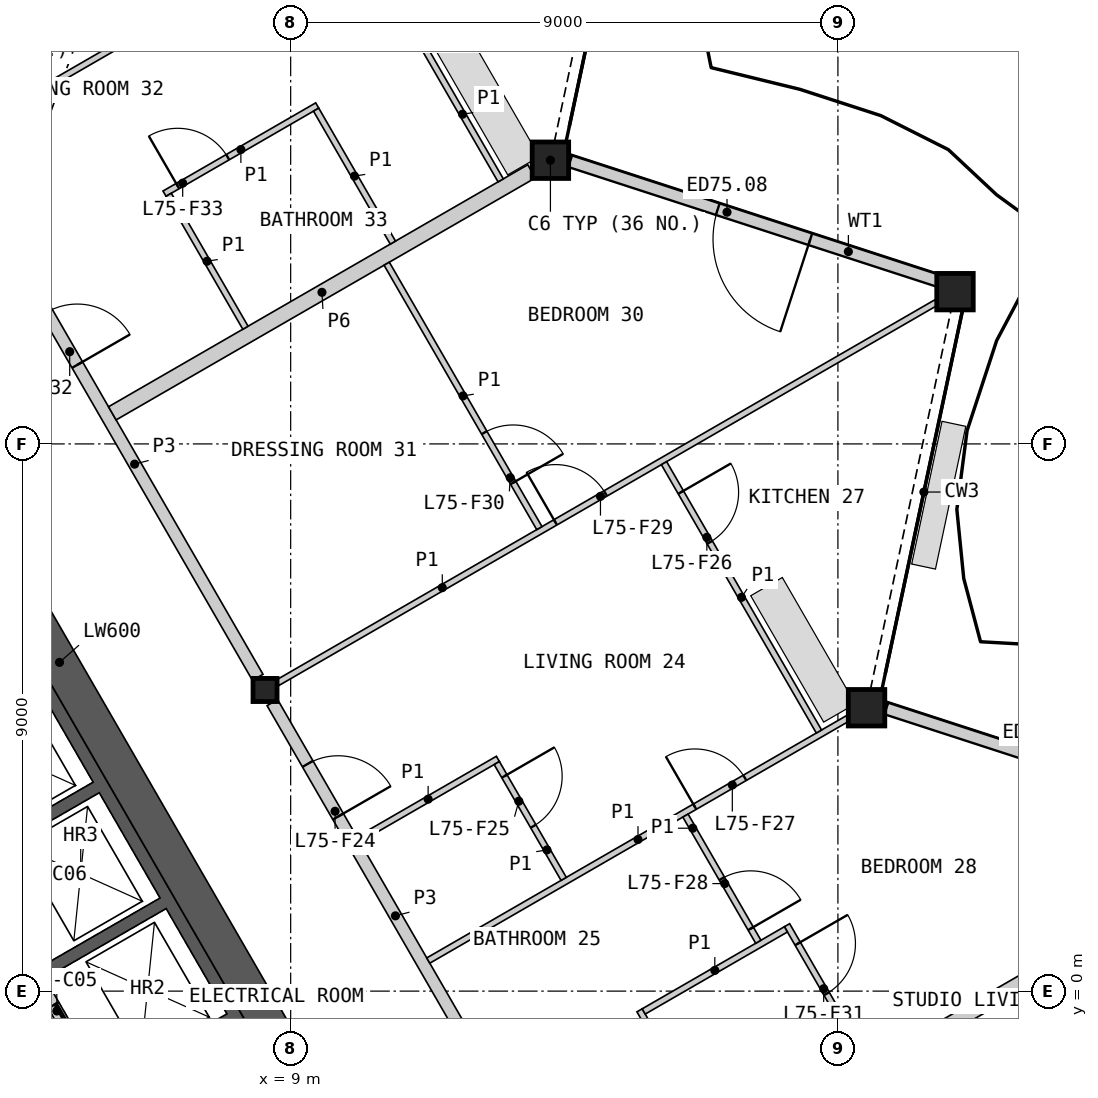
"""IFC4 building model, lengths in metres.
Left out: names, types, materials, properties, quantities, classifications, styles, units other than length and angle.
Written with IfcOpenShell. Run it as: python <this file> out.ifc"""

import sys

from ifc_helpers import new_model, si_unit, direction, frame, frame_2d, origin, origin_2d, place, context, subcontext, project, spatial, polyline, rectangle, hollow_rectangle, i_section, outline, extrude, element, fill, save


model = new_model("IFC4")
c1 = context("Model", 3, precision=1e-05, world=origin(), true_north=direction((0.0, 1.0)))
c2 = subcontext(c1, "Body", "Model", "MODEL_VIEW")
j1 = project(units=[si_unit("LENGTHUNIT", "METRE"), si_unit("PLANEANGLEUNIT", "RADIAN")], contexts=[c1])
p1 = place(None, origin())
s1 = spatial("IfcSite", under=j1, at=p1, CompositionType="ELEMENT")
p2 = place(p1, origin())
s2 = spatial("IfcBuilding", under=s1, at=p2, CompositionType="ELEMENT")
p3 = place(p2, frame((0.0, 0.0, 335.8)))
s3 = spatial("IfcBuildingStorey", under=s2, at=p3, CompositionType="ELEMENT", Elevation=335.8)
for number, where, z_axis, x_axis in (
    (1, (18.471, 4.661, 0.0), (0.0, 0.0, 1.0), (1.0, 0.0, 0.0)),
    (2, (19.926, 11.504, 0.0), (0.0, 0.0, 1.0), (1.0, 0.0, 0.0)),
    (3, (13.272, 13.666, 0.0), (0.0, 0.0, 1.0), (1.0, 0.0, 0.0)),
):
    element("IfcColumn", number, at=place(p3, frame(where, z_axis=z_axis, x_axis=x_axis)), inside=s3, PredefinedType="COLUMN", context=c2, shape_type="SweptSolid", body=[
        extrude(hollow_rectangle(XDim=0.6, YDim=0.6, WallThickness=0.04, at=origin_2d()), origin(), (0.0, 0.0, 1.0), 3.4),
    ])
p4 = place(p3, frame((8.578, 4.953, 0.0), z_axis=(0.0, 0.0, 1.0), x_axis=(1.0, 0.0, 0.0)))
e4 = element("IfcColumn", 4, at=p4, inside=s3, PredefinedType="COLUMN", context=c2, shape_type="SweptSolid", body=[
    extrude(i_section(OverallWidth=0.396, OverallDepth=0.381, WebThickness=0.019, FlangeThickness=0.03, at=origin_2d()), origin(), (0.0, 0.0, 1.0), 3.4),
])
p5 = place(p3, frame((24.893, 2.667, 0.0), z_axis=(0.0, 0.0, 1.0), x_axis=(-0.951058691075, 0.309010301012, 0.0)))
e5 = element("IfcWall", 5, at=p5, inside=s3, PredefinedType="SOLIDWALL", context=c2, shape_type="SweptSolid", body=[
    extrude(rectangle(XDim=6.411, YDim=0.2, at=frame_2d((3.206, 0.0))), origin(), (0.0, 0.0, 1.0), 2.488),
])
p6 = place(p5, frame((2.262, 0.0, 0.0)))
e6 = element("IfcOpeningElement", 6, at=p6, cuts=e5, PredefinedType="OPENING", context=c2, shape_type="SweptSolid", body=[
    extrude(rectangle(XDim=1.6, YDim=2.25, at=frame_2d((0.8, 1.125))), frame((0.0, 0.11, 0.0), z_axis=(0.0, -1.0, 0.0), x_axis=(1.0, 0.0, 0.0)), (0.0, 0.0, 1.0), 0.22),
])
p7 = place(p3, frame((19.697, 11.667, 0.0), z_axis=(0.0, 0.0, 1.0), x_axis=(-0.951053926112, 0.309024966026, 0.0)))
e7 = element("IfcWall", 7, at=p7, inside=s3, PredefinedType="SOLIDWALL", context=c2, shape_type="SweptSolid", body=[
    extrude(rectangle(XDim=6.414, YDim=0.2, at=frame_2d((3.207, 0.0))), origin(), (0.0, 0.0, 1.0), 2.488),
])
p8 = place(p7, frame((2.262, 0.0, 0.0)))
e8 = element("IfcOpeningElement", 8, at=p8, cuts=e7, PredefinedType="OPENING", context=c2, shape_type="SweptSolid", body=[
    extrude(rectangle(XDim=1.6, YDim=2.25, at=frame_2d((0.8, 1.125))), frame((0.0, 0.11, 0.0), z_axis=(0.0, -1.0, 0.0), x_axis=(1.0, 0.0, 0.0)), (0.0, 0.0, 1.0), 0.22),
])
p9 = place(p3, origin())
e9 = element("IfcWall", 9, at=p9, inside=s3, PredefinedType="SHEAR", context=c2, shape_type="SweptSolid", body=[
    extrude(outline(polyline([(1.561, 6.097), (3.731, 7.35), (8.231, -0.444), (6.061, -1.697), (5.96, -1.524), (7.952, -0.374), (6.952, 1.358), (4.96, 0.208), (4.861, 0.381), (6.852, 1.531), (5.852, 3.263), (3.861, 2.113), (3.76, 2.287), (5.752, 3.437), (4.752, 5.169), (2.76, 4.019), (2.66, 4.192), (4.652, 5.342), (3.652, 7.074), (1.66, 5.924), (1.561, 6.097)])), origin(), (0.0, 0.0, 1.0), 3.1),
])
p10 = place(p3, frame((5.817, -1.476, 0.0), z_axis=(0.0, 0.0, 1.0), x_axis=(-0.500002616675, 0.866023893041, 0.0)))
e10 = element("IfcWall", 10, at=p10, inside=s3, PredefinedType="SOLIDWALL", context=c2, shape_type="SweptSolid", body=[
    extrude(rectangle(XDim=8.373, YDim=0.2, at=frame_2d((4.187, 0.0))), origin(), (0.0, 0.0, 1.0), 3.1),
])
p11 = place(p10, frame((0.337, 0.0, 0.0)))
e11 = element("IfcOpeningElement", 11, at=p11, cuts=e10, PredefinedType="OPENING", context=c2, shape_type="SweptSolid", body=[
    extrude(rectangle(XDim=1.1, YDim=2.1, at=frame_2d((0.55, 1.05))), frame((0.0, 0.11, 0.0), z_axis=(0.0, -1.0, 0.0), x_axis=(1.0, 0.0, 0.0)), (0.0, 0.0, 1.0), 0.22),
])
p12 = place(p10, frame((2.537, 0.0, 0.0)))
e12 = element("IfcOpeningElement", 12, at=p12, cuts=e10, PredefinedType="OPENING", context=c2, shape_type="SweptSolid", body=[
    extrude(rectangle(XDim=1.1, YDim=2.1, at=frame_2d((0.55, 1.05))), frame((0.0, 0.11, 0.0), z_axis=(0.0, -1.0, 0.0), x_axis=(1.0, 0.0, 0.0)), (0.0, 0.0, 1.0), 0.22),
])
p13 = place(p10, frame((4.737, 0.0, 0.0)))
e13 = element("IfcOpeningElement", 13, at=p13, cuts=e10, PredefinedType="OPENING", context=c2, shape_type="SweptSolid", body=[
    extrude(rectangle(XDim=1.1, YDim=2.1, at=frame_2d((0.55, 1.05))), frame((0.0, 0.11, 0.0), z_axis=(0.0, -1.0, 0.0), x_axis=(1.0, 0.0, 0.0)), (0.0, 0.0, 1.0), 0.22),
])
p14 = place(p10, frame((7.037, 0.0, 0.0)))
e14 = element("IfcOpeningElement", 14, at=p14, cuts=e10, PredefinedType="OPENING", context=c2, shape_type="SweptSolid", body=[
    extrude(rectangle(XDim=0.9, YDim=2.1, at=frame_2d((0.45, 1.05))), frame((0.0, 0.11, 0.0), z_axis=(0.0, -1.0, 0.0), x_axis=(1.0, 0.0, 0.0)), (0.0, 0.0, 1.0), 0.22),
])
p15 = place(p3, frame((8.841, -0.902, 0.0), z_axis=(0.0, 0.0, 1.0), x_axis=(-0.499995618375, 0.866027933502, 0.0)))
e15 = element("IfcWall", 15, at=p15, inside=s3, PredefinedType="SHEAR", context=c2, shape_type="SweptSolid", body=[
    extrude(rectangle(XDim=14.571, YDim=0.6, at=frame_2d((7.285, 0.0))), origin(), (0.0, 0.0, 1.0), 3.1),
])
p16 = place(p3, frame((4.409, 12.174, 0.0), z_axis=(0.0, 0.0, 1.0), x_axis=(0.499984266882, -0.866034487114, 0.0)))
e16 = element("IfcWall", 16, at=p16, inside=s3, PredefinedType="PARTITIONING", context=c2, shape_type="SweptSolid", body=[
    extrude(rectangle(XDim=8.099, YDim=0.2, at=frame_2d((4.049, 0.0))), origin(), (0.0, 0.0, 1.0), 3.1),
])
p17 = place(p16, frame((1.164, 0.0, 0.0)))
e17 = element("IfcOpeningElement", 17, at=p17, cuts=e16, PredefinedType="OPENING", context=c2, shape_type="SweptSolid", body=[
    extrude(rectangle(XDim=1.0, YDim=2.1, at=frame_2d((0.5, 1.05))), frame((0.0, 0.11, 0.0), z_axis=(0.0, -1.0, 0.0), x_axis=(1.0, 0.0, 0.0)), (0.0, 0.0, 1.0), 0.22),
])
p18 = place(p3, frame((8.698, 4.745, 0.0), z_axis=(0.0, 0.0, 1.0), x_axis=(0.499984266882, -0.866034487114, 0.0)))
e18 = element("IfcWall", 18, at=p18, inside=s3, PredefinedType="PARTITIONING", context=c2, shape_type="SweptSolid", body=[
    extrude(rectangle(XDim=8.099, YDim=0.2, at=frame_2d((4.049, 0.0))), origin(), (0.0, 0.0, 1.0), 3.1),
])
p19 = place(p18, frame((1.164, 0.0, 0.0)))
e19 = element("IfcOpeningElement", 19, at=p19, cuts=e18, PredefinedType="OPENING", context=c2, shape_type="SweptSolid", body=[
    extrude(rectangle(XDim=1.0, YDim=2.1, at=frame_2d((0.5, 1.05))), frame((0.0, 0.11, 0.0), z_axis=(0.0, -1.0, 0.0), x_axis=(1.0, 0.0, 0.0)), (0.0, 0.0, 1.0), 0.22),
])
p20 = place(p3, frame((6.067, 9.503, 0.0), z_axis=(0.0, 0.0, 1.0), x_axis=(0.866032392051, 0.499987895772, 0.0)))
e20 = element("IfcWall", 20, at=p20, inside=s3, PredefinedType="PARTITIONING", context=c2, shape_type="SweptSolid", body=[
    extrude(rectangle(XDim=7.962, YDim=0.25, at=frame_2d((3.981, 0.0))), origin(), (0.0, 0.0, 1.0), 2.33),
])
p21 = place(p3, frame((18.581, -1.272, 0.0), z_axis=(0.0, 0.0, 1.0), x_axis=(0.866024038922, 0.500002364004, 0.0)))
e21 = element("IfcWall", 21, at=p21, inside=s3, PredefinedType="PARTITIONING", context=c2, shape_type="SweptSolid", body=[
    extrude(rectangle(XDim=7.198, YDim=0.25, at=frame_2d((3.599, 0.0))), origin(), (0.0, 0.0, 1.0), 2.33),
])
p22 = place(p3, frame((3.469, 14.003, 0.0), z_axis=(0.0, 0.0, 1.0), x_axis=(0.866021563384, 0.50000665171, 0.0)))
e22 = element("IfcWall", 22, at=p22, inside=s3, PredefinedType="PARTITIONING", context=c2, shape_type="SweptSolid", body=[
    extrude(rectangle(XDim=12.641, YDim=0.1, at=frame_2d((6.321, 0.0))), origin(), (0.0, 0.0, 1.0), 2.33),
])
p23 = place(p22, frame((8.215, 0.0, 0.0)))
e23 = element("IfcOpeningElement", 23, at=p23, cuts=e22, PredefinedType="OPENING", context=c2, shape_type="SweptSolid", body=[
    extrude(rectangle(XDim=0.95, YDim=2.1, at=frame_2d((0.475, 1.05))), frame((0.0, 0.06, 0.0), z_axis=(0.0, -1.0, 0.0), x_axis=(1.0, 0.0, 0.0)), (0.0, 0.0, 1.0), 0.12),
])
p24 = place(p3, frame((8.786, 5.073, 0.0), z_axis=(0.0, 0.0, 1.0), x_axis=(0.86602139559, 0.500006942333, 0.0)))
e24 = element("IfcWall", 24, at=p24, inside=s3, PredefinedType="PARTITIONING", context=c2, shape_type="SweptSolid", body=[
    extrude(rectangle(XDim=12.505, YDim=0.1, at=frame_2d((6.252, 0.0))), origin(), (0.0, 0.0, 1.0), 2.33),
])
p25 = place(p24, frame((5.275, 0.0, 0.0)))
e25 = element("IfcOpeningElement", 25, at=p25, cuts=e24, PredefinedType="OPENING", context=c2, shape_type="SweptSolid", body=[
    extrude(rectangle(XDim=0.95, YDim=2.1, at=frame_2d((0.475, 1.05))), frame((0.0, 0.06, 0.0), z_axis=(0.0, -1.0, 0.0), x_axis=(1.0, 0.0, 0.0)), (0.0, 0.0, 1.0), 0.12),
])
p26 = place(p3, frame((11.263, 0.503, 0.0), z_axis=(0.0, 0.0, 1.0), x_axis=(0.866023773276, 0.500002824113, 0.0)))
e26 = element("IfcWall", 26, at=p26, inside=s3, PredefinedType="PARTITIONING", context=c2, shape_type="SweptSolid", body=[
    extrude(rectangle(XDim=7.965, YDim=0.1, at=frame_2d((3.982, 0.0))), origin(), (0.0, 0.0, 1.0), 2.33),
])
p27 = place(p26, frame((5.061, 0.0, 0.0)))
e27 = element("IfcOpeningElement", 27, at=p27, cuts=e26, PredefinedType="OPENING", context=c2, shape_type="SweptSolid", body=[
    extrude(rectangle(XDim=0.95, YDim=2.1, at=frame_2d((0.475, 1.05))), frame((0.0, 0.06, 0.0), z_axis=(0.0, -1.0, 0.0), x_axis=(1.0, 0.0, 0.0)), (0.0, 0.0, 1.0), 0.12),
])
p28 = place(p3, frame((14.738, -0.316, 0.0), z_axis=(0.0, 0.0, 1.0), x_axis=(0.499996545922, -0.866027397988, 0.0)))
e28 = element("IfcWall", 28, at=p28, inside=s3, PredefinedType="PARTITIONING", context=c2, shape_type="SweptSolid", body=[
    extrude(rectangle(XDim=5.5, YDim=0.1, at=frame_2d((2.75, 0.0))), origin(), (0.0, 0.0, 1.0), 2.33),
])
p29 = place(p3, frame((17.163, 1.084, 0.0), z_axis=(0.0, 0.0, 1.0), x_axis=(0.500015767406, -0.866016300277, 0.0)))
e29 = element("IfcWall", 29, at=p29, inside=s3, PredefinedType="PARTITIONING", context=c2, shape_type="SweptSolid", body=[
    extrude(rectangle(XDim=5.5, YDim=0.1, at=frame_2d((2.75, 0.0))), origin(), (0.0, 0.0, 1.0), 2.33),
])
p30 = place(p29, frame((4.3, 0.0, 0.0)))
e30 = element("IfcOpeningElement", 30, at=p30, cuts=e29, PredefinedType="OPENING", context=c2, shape_type="SweptSolid", body=[
    extrude(rectangle(XDim=0.95, YDim=2.1, at=frame_2d((0.475, 1.05))), frame((0.0, 0.06, 0.0), z_axis=(0.0, -1.0, 0.0), x_axis=(1.0, 0.0, 0.0)), (0.0, 0.0, 1.0), 0.12),
])
p31 = place(p29, frame((0.351, 0.0, 0.0)))
e31 = element("IfcOpeningElement", 31, at=p31, cuts=e29, PredefinedType="OPENING", context=c2, shape_type="SweptSolid", body=[
    extrude(rectangle(XDim=0.95, YDim=2.1, at=frame_2d((0.475, 1.05))), frame((0.0, 0.06, 0.0), z_axis=(0.0, -1.0, 0.0), x_axis=(1.0, 0.0, 0.0)), (0.0, 0.0, 1.0), 0.12),
])
p32 = place(p3, frame((10.579, 11.964, 0.0), z_axis=(0.0, 0.0, 1.0), x_axis=(0.499972176429, -0.866041467135, 0.0)))
e32 = element("IfcWall", 32, at=p32, inside=s3, PredefinedType="PARTITIONING", context=c2, shape_type="SweptSolid", body=[
    extrude(rectangle(XDim=5.021, YDim=0.1, at=frame_2d((2.511, 0.0))), origin(), (0.0, 0.0, 1.0), 2.33),
])
p33 = place(p32, frame((3.209, 0.0, 0.0)))
e33 = element("IfcOpeningElement", 33, at=p33, cuts=e32, PredefinedType="OPENING", context=c2, shape_type="SweptSolid", body=[
    extrude(rectangle(XDim=0.95, YDim=2.1, at=frame_2d((0.475, 1.05))), frame((0.0, 0.06, 0.0), z_axis=(0.0, -1.0, 0.0), x_axis=(1.0, 0.0, 0.0)), (0.0, 0.0, 1.0), 0.12),
])
p34 = place(p3, frame((9.944, 17.684, 0.0), z_axis=(0.0, 0.0, 1.0), x_axis=(0.499972176429, -0.866041467135, 0.0)))
e34 = element("IfcWall", 34, at=p34, inside=s3, PredefinedType="PARTITIONING", context=c2, shape_type="SweptSolid", body=[
    extrude(rectangle(XDim=5.021, YDim=0.1, at=frame_2d((2.511, 0.0))), origin(), (0.0, 0.0, 1.0), 2.33),
])
p35 = place(p34, frame((0.964, 0.0, 0.0)))
e35 = element("IfcOpeningElement", 35, at=p35, cuts=e34, PredefinedType="OPENING", context=c2, shape_type="SweptSolid", body=[
    extrude(rectangle(XDim=0.95, YDim=2.1, at=frame_2d((0.475, 1.05))), frame((0.0, 0.06, 0.0), z_axis=(0.0, -1.0, 0.0), x_axis=(1.0, 0.0, 0.0)), (0.0, 0.0, 1.0), 0.12),
])
p36 = place(p3, frame((15.14, 8.683, 0.0), z_axis=(0.0, 0.0, 1.0), x_axis=(0.499987849973, -0.866032418492, 0.0)))
e36 = element("IfcWall", 36, at=p36, inside=s3, PredefinedType="PARTITIONING", context=c2, shape_type="SweptSolid", body=[
    extrude(rectangle(XDim=5.096, YDim=0.1, at=frame_2d((2.548, 0.0))), origin(), (0.0, 0.0, 1.0), 2.33),
])
p37 = place(p36, frame((0.554, 0.0, 0.0)))
e37 = element("IfcOpeningElement", 37, at=p37, cuts=e36, PredefinedType="OPENING", context=c2, shape_type="SweptSolid", body=[
    extrude(rectangle(XDim=0.95, YDim=2.1, at=frame_2d((0.475, 1.05))), frame((0.0, 0.06, 0.0), z_axis=(0.0, -1.0, 0.0), x_axis=(1.0, 0.0, 0.0)), (0.0, 0.0, 1.0), 0.12),
])
p38 = place(p3, frame((6.925, 13.116, 0.0), z_axis=(0.0, 0.0, 1.0), x_axis=(0.866032775405, 0.499987231761, 0.0)))
e38 = element("IfcWall", 38, at=p38, inside=s3, PredefinedType="PARTITIONING", context=c2, shape_type="SweptSolid", body=[
    extrude(rectangle(XDim=2.9, YDim=0.1, at=frame_2d((1.45, 0.0))), origin(), (0.0, 0.0, 1.0), 2.33),
])
p39 = place(p38, frame((0.25, 0.0, 0.0)))
e39 = element("IfcOpeningElement", 39, at=p39, cuts=e38, PredefinedType="OPENING", context=c2, shape_type="SweptSolid", body=[
    extrude(rectangle(XDim=0.95, YDim=2.1, at=frame_2d((0.475, 1.05))), frame((0.0, 0.06, 0.0), z_axis=(0.0, -1.0, 0.0), x_axis=(1.0, 0.0, 0.0)), (0.0, 0.0, 1.0), 0.12),
])
p40 = place(p3, frame((14.806, -0.334, 0.0), z_axis=(0.0, 0.0, 1.0), x_axis=(0.86599734893, 0.500048589285, 0.0)))
e40 = element("IfcWall", 40, at=p40, inside=s3, PredefinedType="PARTITIONING", context=c2, shape_type="SweptSolid", body=[
    extrude(rectangle(XDim=2.7, YDim=0.1, at=frame_2d((1.35, 0.0))), origin(), (0.0, 0.0, 1.0), 2.33),
])
p41 = place(p3, frame((10.113, 2.494, 0.0), z_axis=(0.0, 0.0, 1.0), x_axis=(0.865989200783, 0.500062700197, 0.0)))
e41 = element("IfcWall", 41, at=p41, inside=s3, PredefinedType="PARTITIONING", context=c2, shape_type="SweptSolid", body=[
    extrude(rectangle(XDim=2.65, YDim=0.1, at=frame_2d((1.325, 0.0))), origin(), (0.0, 0.0, 1.0), 2.33),
])
for number, where, z_axis, x_axis in (
    (42, (9.418, 14.498, 0.0), (0.0, 0.0, 1.0), (0.5, -0.866, 0.0)),
    (43, (6.994, 13.098, 0.0), (0.0, 0.0, 1.0), (0.5, -0.866, 0.0)),
):
    element("IfcWall", number, at=place(p3, frame(where, z_axis=z_axis, x_axis=x_axis)), inside=s3, PredefinedType="PARTITIONING", context=c2, shape_type="SweptSolid", body=[
        extrude(rectangle(XDim=2.525, YDim=0.1, at=frame_2d((1.262, 0.0))), origin(), (0.0, 0.0, 1.0), 2.33),
    ])
p42 = place(p3, frame((15.493, 2.887, 0.0), z_axis=(0.0, 0.0, 1.0), x_axis=(0.499963527173, -0.866046460357, 0.0)))
e44 = element("IfcWall", 44, at=p42, inside=s3, PredefinedType="PARTITIONING", context=c2, shape_type="SweptSolid", body=[
    extrude(rectangle(XDim=2.396, YDim=0.1, at=frame_2d((1.198, 0.0))), origin(), (0.0, 0.0, 1.0), 2.33),
])
p43 = place(p42, frame((1.196, 0.0, 0.0)))
e45 = element("IfcOpeningElement", 45, at=p43, cuts=e44, PredefinedType="OPENING", context=c2, shape_type="SweptSolid", body=[
    extrude(rectangle(XDim=0.95, YDim=2.1, at=frame_2d((0.475, 1.05))), frame((0.0, 0.06, 0.0), z_axis=(0.0, -1.0, 0.0), x_axis=(1.0, 0.0, 0.0)), (0.0, 0.0, 1.0), 0.12),
])
p44 = place(p3, frame((12.39, 3.751, 0.0), z_axis=(0.0, 0.0, 1.0), x_axis=(0.50002983664, -0.866008176907, 0.0)))
e46 = element("IfcWall", 46, at=p44, inside=s3, PredefinedType="PARTITIONING", context=c2, shape_type="SweptSolid", body=[
    extrude(rectangle(XDim=2.2, YDim=0.1, at=frame_2d((1.1, 0.0))), origin(), (0.0, 0.0, 1.0), 2.33),
])
p45 = place(p44, frame((0.25, 0.0, 0.0)))
e47 = element("IfcOpeningElement", 47, at=p45, cuts=e46, PredefinedType="OPENING", context=c2, shape_type="SweptSolid", body=[
    extrude(rectangle(XDim=0.95, YDim=2.1, at=frame_2d((0.475, 1.05))), frame((0.0, 0.06, 0.0), z_axis=(0.0, -1.0, 0.0), x_axis=(1.0, 0.0, 0.0)), (0.0, 0.0, 1.0), 0.12),
])
p46 = place(p8, origin())
e48 = element("IfcDoor", 48, at=p46, inside=s3, OperationType="DOUBLE_DOOR_SINGLE_SWING", PredefinedType="DOOR", context=c2, shape_type="SweptSolid", body=[
    extrude(rectangle(XDim=1.6, YDim=2.25, at=frame_2d((0.8, 1.125))), frame((0.0, 0.025, 0.0), z_axis=(0.0, -1.0, 0.0), x_axis=(1.0, 0.0, 0.0)), (0.0, 0.0, 1.0), 0.05),
])
fill(e8, e48)
p47 = place(p11, origin())
e49 = element("IfcDoor", 49, at=p47, inside=s3, OperationType="SLIDING_TO_LEFT", PredefinedType="DOOR", context=c2, shape_type="SweptSolid", body=[
    extrude(rectangle(XDim=1.1, YDim=2.1, at=frame_2d((0.55, 1.05))), frame((0.0, 0.025, 0.0), z_axis=(0.0, -1.0, 0.0), x_axis=(1.0, 0.0, 0.0)), (0.0, 0.0, 1.0), 0.05),
])
fill(e11, e49)
p48 = place(p19, origin())
e50 = element("IfcDoor", 50, at=p48, inside=s3, OperationType="SINGLE_SWING_RIGHT", PredefinedType="DOOR", context=c2, shape_type="SweptSolid", body=[
    extrude(rectangle(XDim=1.0, YDim=2.1, at=frame_2d((0.5, 1.05))), frame((0.0, 0.025, 0.0), z_axis=(0.0, -1.0, 0.0), x_axis=(1.0, 0.0, 0.0)), (0.0, 0.0, 1.0), 0.05),
])
fill(e19, e50)
p49 = place(p45, origin())
e51 = element("IfcDoor", 51, at=p49, inside=s3, OperationType="SINGLE_SWING_LEFT", PredefinedType="DOOR", context=c2, shape_type="SweptSolid", body=[
    extrude(rectangle(XDim=0.95, YDim=2.1, at=frame_2d((0.475, 1.05))), frame((0.0, 0.025, 0.0), z_axis=(0.0, -1.0, 0.0), x_axis=(1.0, 0.0, 0.0)), (0.0, 0.0, 1.0), 0.05),
])
fill(e47, e51)
p50 = place(p37, origin())
e52 = element("IfcDoor", 52, at=p50, inside=s3, OperationType="SINGLE_SWING_LEFT", PredefinedType="DOOR", context=c2, shape_type="SweptSolid", body=[
    extrude(rectangle(XDim=0.95, YDim=2.1, at=frame_2d((0.475, 1.05))), frame((0.0, 0.025, 0.0), z_axis=(0.0, -1.0, 0.0), x_axis=(1.0, 0.0, 0.0)), (0.0, 0.0, 1.0), 0.05),
])
fill(e37, e52)
p51 = place(p27, origin())
e53 = element("IfcDoor", 53, at=p51, inside=s3, OperationType="SINGLE_SWING_LEFT", PredefinedType="DOOR", context=c2, shape_type="SweptSolid", body=[
    extrude(rectangle(XDim=0.95, YDim=2.1, at=frame_2d((0.475, 1.05))), frame((0.0, 0.025, 0.0), z_axis=(0.0, -1.0, 0.0), x_axis=(1.0, 0.0, 0.0)), (0.0, 0.0, 1.0), 0.05),
])
fill(e27, e53)
p52 = place(p43, origin())
e54 = element("IfcDoor", 54, at=p52, inside=s3, OperationType="SINGLE_SWING_RIGHT", PredefinedType="DOOR", context=c2, shape_type="SweptSolid", body=[
    extrude(rectangle(XDim=0.95, YDim=2.1, at=frame_2d((0.475, 1.05))), frame((0.0, 0.025, 0.0), z_axis=(0.0, -1.0, 0.0), x_axis=(1.0, 0.0, 0.0)), (0.0, 0.0, 1.0), 0.05),
])
fill(e45, e54)
p53 = place(p25, origin())
e55 = element("IfcDoor", 55, at=p53, inside=s3, OperationType="SINGLE_SWING_LEFT", PredefinedType="DOOR", context=c2, shape_type="SweptSolid", body=[
    extrude(rectangle(XDim=0.95, YDim=2.1, at=frame_2d((0.475, 1.05))), frame((0.0, 0.025, 0.0), z_axis=(0.0, -1.0, 0.0), x_axis=(1.0, 0.0, 0.0)), (0.0, 0.0, 1.0), 0.05),
])
fill(e25, e55)
p54 = place(p33, origin())
e56 = element("IfcDoor", 56, at=p54, inside=s3, OperationType="SINGLE_SWING_RIGHT", PredefinedType="DOOR", context=c2, shape_type="SweptSolid", body=[
    extrude(rectangle(XDim=0.95, YDim=2.1, at=frame_2d((0.475, 1.05))), frame((0.0, 0.025, 0.0), z_axis=(0.0, -1.0, 0.0), x_axis=(1.0, 0.0, 0.0)), (0.0, 0.0, 1.0), 0.05),
])
fill(e33, e56)
p55 = place(p31, origin())
e57 = element("IfcDoor", 57, at=p55, inside=s3, OperationType="SINGLE_SWING_LEFT", PredefinedType="DOOR", context=c2, shape_type="SweptSolid", body=[
    extrude(rectangle(XDim=0.95, YDim=2.1, at=frame_2d((0.475, 1.05))), frame((0.0, 0.025, 0.0), z_axis=(0.0, -1.0, 0.0), x_axis=(1.0, 0.0, 0.0)), (0.0, 0.0, 1.0), 0.05),
])
fill(e31, e57)
p56 = place(p17, origin())
e58 = element("IfcDoor", 58, at=p56, inside=s3, OperationType="SINGLE_SWING_RIGHT", PredefinedType="DOOR", context=c2, shape_type="SweptSolid", body=[
    extrude(rectangle(XDim=1.0, YDim=2.1, at=frame_2d((0.5, 1.05))), frame((0.0, 0.025, 0.0), z_axis=(0.0, -1.0, 0.0), x_axis=(1.0, 0.0, 0.0)), (0.0, 0.0, 1.0), 0.05),
])
fill(e17, e58)
p57 = place(p39, origin())
e59 = element("IfcDoor", 59, at=p57, inside=s3, OperationType="SINGLE_SWING_LEFT", PredefinedType="DOOR", context=c2, shape_type="SweptSolid", body=[
    extrude(rectangle(XDim=0.95, YDim=2.1, at=frame_2d((0.475, 1.05))), frame((0.0, 0.025, 0.0), z_axis=(0.0, -1.0, 0.0), x_axis=(1.0, 0.0, 0.0)), (0.0, 0.0, 1.0), 0.05),
])
fill(e39, e59)
save(model, sys.argv[1])
